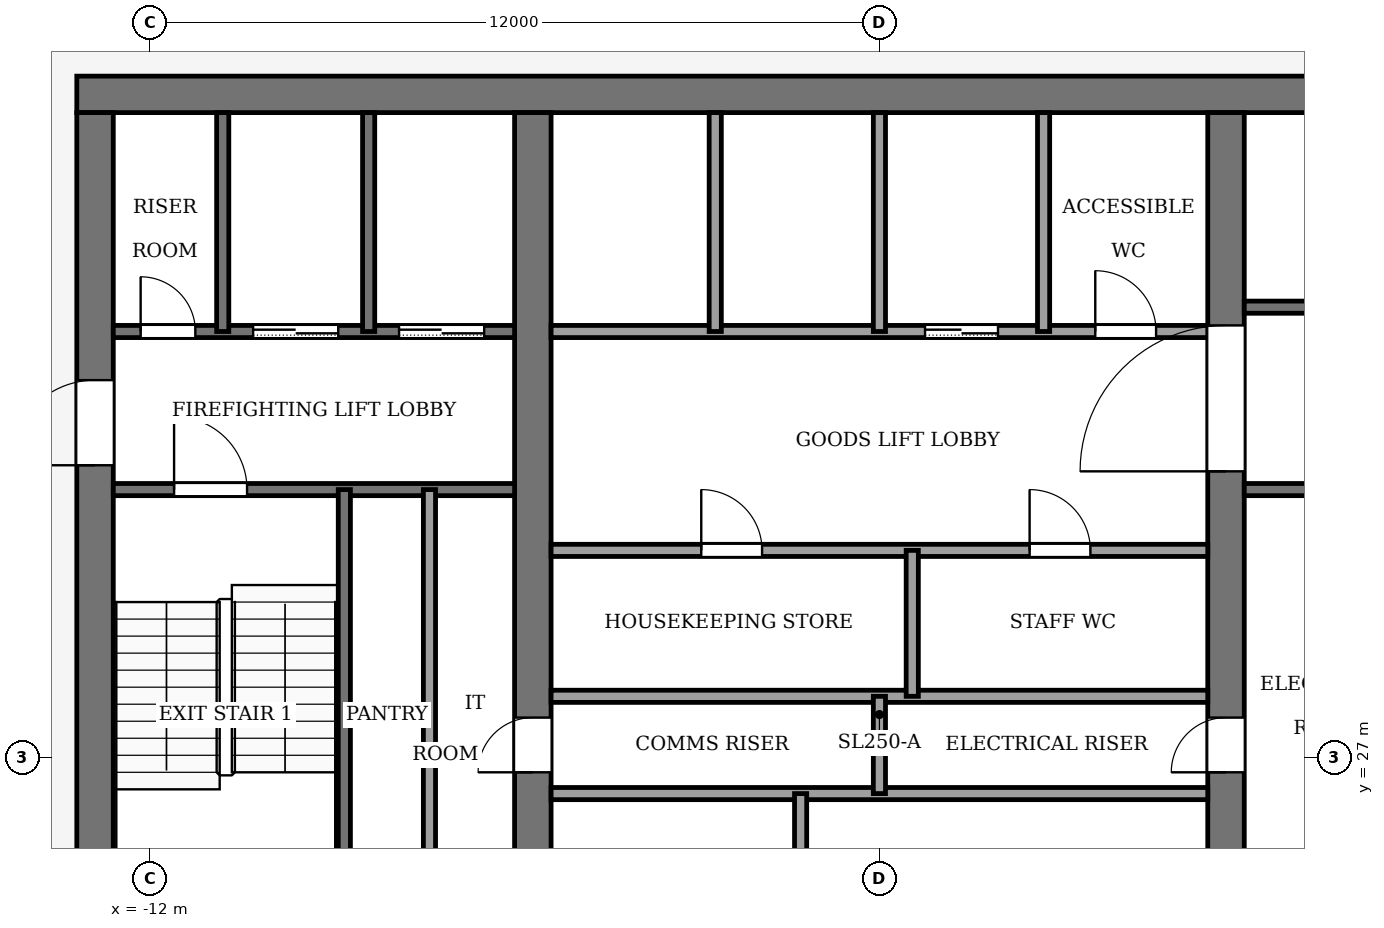
"""IFC4 building model, lengths in metres.
Left out: names, types, materials, properties, quantities, classifications, styles, units other than length and angle.
Written with IfcOpenShell. Run it as: python <this file> out.ifc"""

import sys

from ifc_helpers import new_model, si_unit, direction, frame, frame_2d, origin, place, context, subcontext, project, spatial, rectangle, extrude, element, fill, save


model = new_model("IFC4")
c1 = context("Model", 3, precision=1e-05, world=origin(), true_north=direction((0.0, 1.0)))
c2 = subcontext(c1, "Body", "Model", "MODEL_VIEW")
j1 = project(units=[si_unit("LENGTHUNIT", "METRE"), si_unit("PLANEANGLEUNIT", "RADIAN")], contexts=[c1])
p1 = place(None, origin())
s1 = spatial("IfcSite", under=j1, at=p1, CompositionType="ELEMENT")
p2 = place(p1, origin())
s2 = spatial("IfcBuilding", under=s1, at=p2, CompositionType="ELEMENT")
p3 = place(p2, frame((0.0, 0.0, 314.0)))
s3 = spatial("IfcBuildingStorey", under=s2, at=p3, CompositionType="ELEMENT", Elevation=314.0)
p4 = place(p3, frame((-13.2, 37.9, -0.13), z_axis=(0.0, 0.0, 1.0), x_axis=(1.0, 0.0, 0.0)))
e1 = element("IfcWall", 1, at=p4, inside=s3, PredefinedType="SHEAR", context=c2, shape_type="SweptSolid", body=[
    extrude(rectangle(XDim=26.4, YDim=0.6, at=frame_2d((13.2, 0.0))), origin(), (0.0, 0.0, 1.0), 4.0),
])
p5 = place(p3, frame((-12.9, 18.4, -0.13), z_axis=(0.0, 0.0, 1.0), x_axis=(0.0, 1.0, 0.0)))
e2 = element("IfcWall", 2, at=p5, inside=s3, PredefinedType="SHEAR", context=c2, shape_type="SweptSolid", body=[
    extrude(rectangle(XDim=19.2, YDim=0.6, at=frame_2d((9.6, 0.0))), origin(), (0.0, 0.0, 1.0), 4.0),
])
p6 = place(p5, frame((2.8, 0.0, 0.13)))
e3 = element("IfcOpeningElement", 3, at=p6, cuts=e2, PredefinedType="OPENING", context=c2, shape_type="SweptSolid", body=[
    extrude(rectangle(XDim=2.4, YDim=2.4, at=frame_2d((1.2, 1.2))), frame((0.0, 0.31, 0.0), z_axis=(0.0, -1.0, 0.0), x_axis=(1.0, 0.0, 0.0)), (0.0, 0.0, 1.0), 0.62),
])
p7 = place(p5, frame((13.4, 0.0, 0.13)))
e4 = element("IfcOpeningElement", 4, at=p7, cuts=e2, PredefinedType="OPENING", context=c2, shape_type="SweptSolid", body=[
    extrude(rectangle(XDim=1.4, YDim=2.2, at=frame_2d((0.7, 1.1))), frame((0.0, 0.31, 0.0), z_axis=(0.0, -1.0, 0.0), x_axis=(1.0, 0.0, 0.0)), (0.0, 0.0, 1.0), 0.62),
])
p8 = place(p3, frame((-5.7, 18.4, -0.13), z_axis=(0.0, 0.0, 1.0), x_axis=(0.0, 1.0, 0.0)))
e5 = element("IfcWall", 5, at=p8, inside=s3, PredefinedType="SHEAR", context=c2, shape_type="SweptSolid", body=[
    extrude(rectangle(XDim=19.2, YDim=0.6, at=frame_2d((9.6, 0.0))), origin(), (0.0, 0.0, 1.0), 4.0),
])
p9 = place(p8, frame((8.35, 0.0, 0.13)))
e6 = element("IfcOpeningElement", 6, at=p9, cuts=e5, PredefinedType="OPENING", context=c2, shape_type="SweptSolid", body=[
    extrude(rectangle(XDim=0.9, YDim=2.1, at=frame_2d((0.45, 1.05))), frame((0.0, 0.31, 0.0), z_axis=(0.0, -1.0, 0.0), x_axis=(1.0, 0.0, 0.0)), (0.0, 0.0, 1.0), 0.62),
])
p10 = place(p3, frame((5.7, 18.4, -0.13), z_axis=(0.0, 0.0, 1.0), x_axis=(0.0, 1.0, 0.0)))
e7 = element("IfcWall", 7, at=p10, inside=s3, PredefinedType="SHEAR", context=c2, shape_type="SweptSolid", body=[
    extrude(rectangle(XDim=19.2, YDim=0.6, at=frame_2d((9.6, 0.0))), origin(), (0.0, 0.0, 1.0), 4.0),
])
p11 = place(p10, frame((8.35, 0.0, 0.13)))
e8 = element("IfcOpeningElement", 8, at=p11, cuts=e7, PredefinedType="OPENING", context=c2, shape_type="SweptSolid", body=[
    extrude(rectangle(XDim=0.9, YDim=2.1, at=frame_2d((0.45, 1.05))), frame((0.0, 0.31, 0.0), z_axis=(0.0, -1.0, 0.0), x_axis=(1.0, 0.0, 0.0)), (0.0, 0.0, 1.0), 0.62),
])
p12 = place(p10, frame((13.3, 0.0, 0.13)))
e9 = element("IfcOpeningElement", 9, at=p12, cuts=e7, PredefinedType="OPENING", context=c2, shape_type="SweptSolid", body=[
    extrude(rectangle(XDim=2.4, YDim=2.4, at=frame_2d((1.2, 1.2))), frame((0.0, 0.31, 0.0), z_axis=(0.0, -1.0, 0.0), x_axis=(1.0, 0.0, 0.0)), (0.0, 0.0, 1.0), 0.62),
])
for number, where, z_axis, x_axis in (
    (10, (-5.4, 26.4, 0.0), (0.0, 0.0, 1.0), (1.0, 0.0, 0.0)),
    (11, (-5.4, 28.0, 0.0), (0.0, 0.0, 1.0), (1.0, 0.0, 0.0)),
):
    element("IfcWall", number, at=place(p3, frame(where, z_axis=z_axis, x_axis=x_axis)), inside=s3, PredefinedType="PARTITIONING", context=c2, shape_type="SweptSolid", body=[
        extrude(rectangle(XDim=10.8, YDim=0.2, at=frame_2d((5.4, 0.0))), origin(), (0.0, 0.0, 1.0), 3.87),
    ])
p13 = place(p3, frame((-5.4, 30.4, 0.0), z_axis=(0.0, 0.0, 1.0), x_axis=(1.0, 0.0, 0.0)))
e12 = element("IfcWall", 12, at=p13, inside=s3, PredefinedType="PARTITIONING", context=c2, shape_type="SweptSolid", body=[
    extrude(rectangle(XDim=10.8, YDim=0.2, at=frame_2d((5.4, 0.0))), origin(), (0.0, 0.0, 1.0), 3.87),
])
p14 = place(p13, frame((2.47, 0.0, 0.0)))
e13 = element("IfcOpeningElement", 13, at=p14, cuts=e12, PredefinedType="OPENING", context=c2, shape_type="SweptSolid", body=[
    extrude(rectangle(XDim=1.0, YDim=2.1, at=frame_2d((0.5, 1.05))), frame((0.0, 0.11, 0.0), z_axis=(0.0, -1.0, 0.0), x_axis=(1.0, 0.0, 0.0)), (0.0, 0.0, 1.0), 0.22),
])
p15 = place(p13, frame((7.87, 0.0, 0.0)))
e14 = element("IfcOpeningElement", 14, at=p15, cuts=e12, PredefinedType="OPENING", context=c2, shape_type="SweptSolid", body=[
    extrude(rectangle(XDim=1.0, YDim=2.1, at=frame_2d((0.5, 1.05))), frame((0.0, 0.11, 0.0), z_axis=(0.0, -1.0, 0.0), x_axis=(1.0, 0.0, 0.0)), (0.0, 0.0, 1.0), 0.22),
])
p16 = place(p3, frame((-12.6, 31.4, 0.0), z_axis=(0.0, 0.0, 1.0), x_axis=(1.0, 0.0, 0.0)))
e15 = element("IfcWall", 15, at=p16, inside=s3, PredefinedType="PARTITIONING", context=c2, shape_type="SweptSolid", body=[
    extrude(rectangle(XDim=6.6, YDim=0.2, at=frame_2d((3.3, 0.0))), origin(), (0.0, 0.0, 1.0), 3.87),
])
p17 = place(p16, frame((1.0, 0.0, 0.0)))
e16 = element("IfcOpeningElement", 16, at=p17, cuts=e15, PredefinedType="OPENING", context=c2, shape_type="SweptSolid", body=[
    extrude(rectangle(XDim=1.2, YDim=2.2, at=frame_2d((0.6, 1.1))), frame((0.0, 0.11, 0.0), z_axis=(0.0, -1.0, 0.0), x_axis=(1.0, 0.0, 0.0)), (0.0, 0.0, 1.0), 0.22),
])
p18 = place(p3, frame((6.0, 31.4, 0.0), z_axis=(0.0, 0.0, 1.0), x_axis=(1.0, 0.0, 0.0)))
e17 = element("IfcWall", 17, at=p18, inside=s3, PredefinedType="PARTITIONING", context=c2, shape_type="SweptSolid", body=[
    extrude(rectangle(XDim=6.6, YDim=0.2, at=frame_2d((3.3, 0.0))), origin(), (0.0, 0.0, 1.0), 3.87),
])
p19 = place(p3, frame((-12.6, 34.0, 0.0), z_axis=(0.0, 0.0, 1.0), x_axis=(1.0, 0.0, 0.0)))
e18 = element("IfcWall", 18, at=p19, inside=s3, PredefinedType="PARTITIONING", context=c2, shape_type="SweptSolid", body=[
    extrude(rectangle(XDim=6.6, YDim=0.2, at=frame_2d((3.3, 0.0))), origin(), (0.0, 0.0, 1.0), 3.87),
])
p20 = place(p19, frame((4.7, 0.0, 0.0)))
e19 = element("IfcOpeningElement", 19, at=p20, cuts=e18, PredefinedType="OPENING", context=c2, shape_type="SweptSolid", body=[
    extrude(rectangle(XDim=1.4, YDim=2.2, at=frame_2d((0.7, 1.1))), frame((0.0, 0.11, 0.0), z_axis=(0.0, -1.0, 0.0), x_axis=(1.0, 0.0, 0.0)), (0.0, 0.0, 1.0), 0.22),
])
p21 = place(p19, frame((2.3, 0.0, 0.0)))
e20 = element("IfcOpeningElement", 20, at=p21, cuts=e18, PredefinedType="OPENING", context=c2, shape_type="SweptSolid", body=[
    extrude(rectangle(XDim=1.4, YDim=2.2, at=frame_2d((0.7, 1.1))), frame((0.0, 0.11, 0.0), z_axis=(0.0, -1.0, 0.0), x_axis=(1.0, 0.0, 0.0)), (0.0, 0.0, 1.0), 0.22),
])
p22 = place(p19, frame((0.45, 0.0, 0.0)))
e21 = element("IfcOpeningElement", 21, at=p22, cuts=e18, PredefinedType="OPENING", context=c2, shape_type="SweptSolid", body=[
    extrude(rectangle(XDim=0.9, YDim=2.1, at=frame_2d((0.45, 1.05))), frame((0.0, 0.11, 0.0), z_axis=(0.0, -1.0, 0.0), x_axis=(1.0, 0.0, 0.0)), (0.0, 0.0, 1.0), 0.22),
])
p23 = place(p3, frame((-5.4, 34.0, 0.0), z_axis=(0.0, 0.0, 1.0), x_axis=(1.0, 0.0, 0.0)))
e22 = element("IfcWall", 22, at=p23, inside=s3, PredefinedType="PARTITIONING", context=c2, shape_type="SweptSolid", body=[
    extrude(rectangle(XDim=10.8, YDim=0.2, at=frame_2d((5.4, 0.0))), origin(), (0.0, 0.0, 1.0), 3.87),
])
p24 = place(p23, frame((6.15, 0.0, 0.0)))
e23 = element("IfcOpeningElement", 23, at=p24, cuts=e22, PredefinedType="OPENING", context=c2, shape_type="SweptSolid", body=[
    extrude(rectangle(XDim=1.2, YDim=2.2, at=frame_2d((0.6, 1.1))), frame((0.0, 0.11, 0.0), z_axis=(0.0, -1.0, 0.0), x_axis=(1.0, 0.0, 0.0)), (0.0, 0.0, 1.0), 0.22),
])
p25 = place(p23, frame((8.95, 0.0, 0.0)))
e24 = element("IfcOpeningElement", 24, at=p25, cuts=e22, PredefinedType="OPENING", context=c2, shape_type="SweptSolid", body=[
    extrude(rectangle(XDim=1.0, YDim=2.1, at=frame_2d((0.5, 1.05))), frame((0.0, 0.11, 0.0), z_axis=(0.0, -1.0, 0.0), x_axis=(1.0, 0.0, 0.0)), (0.0, 0.0, 1.0), 0.22),
])
p26 = place(p3, frame((6.0, 34.4, 0.0), z_axis=(0.0, 0.0, 1.0), x_axis=(1.0, 0.0, 0.0)))
e25 = element("IfcWall", 25, at=p26, inside=s3, PredefinedType="PARTITIONING", context=c2, shape_type="SweptSolid", body=[
    extrude(rectangle(XDim=6.6, YDim=0.2, at=frame_2d((3.3, 0.0))), origin(), (0.0, 0.0, 1.0), 3.87),
])
p27 = place(p26, frame((4.8, 0.0, 0.0)))
e26 = element("IfcOpeningElement", 26, at=p27, cuts=e25, PredefinedType="OPENING", context=c2, shape_type="SweptSolid", body=[
    extrude(rectangle(XDim=1.2, YDim=2.2, at=frame_2d((0.6, 1.1))), frame((0.0, 0.11, 0.0), z_axis=(0.0, -1.0, 0.0), x_axis=(1.0, 0.0, 0.0)), (0.0, 0.0, 1.0), 0.22),
])
p28 = place(p3, frame((-10.8, 34.0, 0.0), z_axis=(0.0, 0.0, 1.0), x_axis=(0.0, 1.0, 0.0)))
e27 = element("IfcWall", 27, at=p28, inside=s3, PredefinedType="PARTITIONING", context=c2, shape_type="SweptSolid", body=[
    extrude(rectangle(XDim=3.6, YDim=0.2, at=frame_2d((1.8, 0.0))), origin(), (0.0, 0.0, 1.0), 3.87),
])
p29 = place(p3, frame((-8.8, 24.0, 0.0), z_axis=(0.0, 0.0, 1.0), x_axis=(0.0, 1.0, 0.0)))
e28 = element("IfcWall", 28, at=p29, inside=s3, PredefinedType="PARTITIONING", context=c2, shape_type="SweptSolid", body=[
    extrude(rectangle(XDim=7.4, YDim=0.2, at=frame_2d((3.7, 0.0))), origin(), (0.0, 0.0, 1.0), 3.87),
])
p30 = place(p3, frame((-8.4, 34.0, 0.0), z_axis=(0.0, 0.0, 1.0), x_axis=(0.0, 1.0, 0.0)))
e29 = element("IfcWall", 29, at=p30, inside=s3, PredefinedType="PARTITIONING", context=c2, shape_type="SweptSolid", body=[
    extrude(rectangle(XDim=3.6, YDim=0.2, at=frame_2d((1.8, 0.0))), origin(), (0.0, 0.0, 1.0), 3.87),
])
p31 = place(p3, frame((-7.4, 24.0, 0.0), z_axis=(0.0, 0.0, 1.0), x_axis=(0.0, 1.0, 0.0)))
e30 = element("IfcWall", 30, at=p31, inside=s3, PredefinedType="PARTITIONING", context=c2, shape_type="SweptSolid", body=[
    extrude(rectangle(XDim=7.4, YDim=0.2, at=frame_2d((3.7, 0.0))), origin(), (0.0, 0.0, 1.0), 3.87),
])
p32 = place(p3, frame((-2.7, 34.0, 0.0), z_axis=(0.0, 0.0, 1.0), x_axis=(0.0, 1.0, 0.0)))
e31 = element("IfcWall", 31, at=p32, inside=s3, PredefinedType="PARTITIONING", context=c2, shape_type="SweptSolid", body=[
    extrude(rectangle(XDim=3.6, YDim=0.2, at=frame_2d((1.8, 0.0))), origin(), (0.0, 0.0, 1.0), 3.87),
])
p33 = place(p3, frame((-1.296, 24.0, 0.0), z_axis=(0.0, 0.0, 1.0), x_axis=(0.0, 1.0, 0.0)))
e32 = element("IfcWall", 32, at=p33, inside=s3, PredefinedType="PARTITIONING", context=c2, shape_type="SweptSolid", body=[
    extrude(rectangle(XDim=2.4, YDim=0.2, at=frame_2d((1.2, 0.0))), origin(), (0.0, 0.0, 1.0), 3.87),
])
p34 = place(p3, frame((0.0, 26.4, 0.0), z_axis=(0.0, 0.0, 1.0), x_axis=(0.0, 1.0, 0.0)))
e33 = element("IfcWall", 33, at=p34, inside=s3, PredefinedType="PARTITIONING", context=c2, shape_type="SweptSolid", body=[
    extrude(rectangle(XDim=1.6, YDim=0.2, at=frame_2d((0.8, 0.0))), origin(), (0.0, 0.0, 1.0), 3.87),
])
p35 = place(p3, frame((0.0, 34.0, 0.0), z_axis=(0.0, 0.0, 1.0), x_axis=(0.0, 1.0, 0.0)))
e34 = element("IfcWall", 34, at=p35, inside=s3, PredefinedType="PARTITIONING", context=c2, shape_type="SweptSolid", body=[
    extrude(rectangle(XDim=3.6, YDim=0.2, at=frame_2d((1.8, 0.0))), origin(), (0.0, 0.0, 1.0), 3.87),
])
p36 = place(p3, frame((0.54, 28.0, 0.0), z_axis=(0.0, 0.0, 1.0), x_axis=(0.0, 1.0, 0.0)))
e35 = element("IfcWall", 35, at=p36, inside=s3, PredefinedType="PARTITIONING", context=c2, shape_type="SweptSolid", body=[
    extrude(rectangle(XDim=2.4, YDim=0.2, at=frame_2d((1.2, 0.0))), origin(), (0.0, 0.0, 1.0), 3.87),
])
p37 = place(p3, frame((2.7, 34.0, 0.0), z_axis=(0.0, 0.0, 1.0), x_axis=(0.0, 1.0, 0.0)))
e36 = element("IfcWall", 36, at=p37, inside=s3, PredefinedType="PARTITIONING", context=c2, shape_type="SweptSolid", body=[
    extrude(rectangle(XDim=3.6, YDim=0.2, at=frame_2d((1.8, 0.0))), origin(), (0.0, 0.0, 1.0), 3.87),
])
p38 = place(p24, origin())
e37 = element("IfcDoor", 37, at=p38, inside=s3, OperationType="SLIDING_TO_LEFT", PredefinedType="DOOR", context=c2, shape_type="SweptSolid", body=[
    extrude(rectangle(XDim=1.2, YDim=2.2, at=frame_2d((0.6, 1.1))), frame((0.0, 0.025, 0.0), z_axis=(0.0, -1.0, 0.0), x_axis=(1.0, 0.0, 0.0)), (0.0, 0.0, 1.0), 0.05),
])
fill(e23, e37)
p39 = place(p20, origin())
e38 = element("IfcDoor", 38, at=p39, inside=s3, OperationType="SLIDING_TO_LEFT", PredefinedType="DOOR", context=c2, shape_type="SweptSolid", body=[
    extrude(rectangle(XDim=1.4, YDim=2.2, at=frame_2d((0.7, 1.1))), frame((0.0, 0.025, 0.0), z_axis=(0.0, -1.0, 0.0), x_axis=(1.0, 0.0, 0.0)), (0.0, 0.0, 1.0), 0.05),
])
fill(e19, e38)
p40 = place(p21, origin())
e39 = element("IfcDoor", 39, at=p40, inside=s3, OperationType="SLIDING_TO_LEFT", PredefinedType="DOOR", context=c2, shape_type="SweptSolid", body=[
    extrude(rectangle(XDim=1.4, YDim=2.2, at=frame_2d((0.7, 1.1))), frame((0.0, 0.025, 0.0), z_axis=(0.0, -1.0, 0.0), x_axis=(1.0, 0.0, 0.0)), (0.0, 0.0, 1.0), 0.05),
])
fill(e20, e39)
p41 = place(p22, origin())
e40 = element("IfcDoor", 40, at=p41, inside=s3, OperationType="SINGLE_SWING_RIGHT", PredefinedType="DOOR", context=c2, shape_type="SweptSolid", body=[
    extrude(rectangle(XDim=0.9, YDim=2.1, at=frame_2d((0.45, 1.05))), frame((0.0, 0.025, 0.0), z_axis=(0.0, -1.0, 0.0), x_axis=(1.0, 0.0, 0.0)), (0.0, 0.0, 1.0), 0.05),
])
fill(e21, e40)
p42 = place(p14, origin())
e41 = element("IfcDoor", 41, at=p42, inside=s3, OperationType="SINGLE_SWING_RIGHT", PredefinedType="DOOR", context=c2, shape_type="SweptSolid", body=[
    extrude(rectangle(XDim=1.0, YDim=2.1, at=frame_2d((0.5, 1.05))), frame((0.0, 0.025, 0.0), z_axis=(0.0, -1.0, 0.0), x_axis=(1.0, 0.0, 0.0)), (0.0, 0.0, 1.0), 0.05),
])
fill(e13, e41)
p43 = place(p15, origin())
e42 = element("IfcDoor", 42, at=p43, inside=s3, OperationType="SINGLE_SWING_LEFT", PredefinedType="DOOR", context=c2, shape_type="SweptSolid", body=[
    extrude(rectangle(XDim=1.0, YDim=2.1, at=frame_2d((0.5, 1.05))), frame((0.0, 0.025, 0.0), z_axis=(0.0, -1.0, 0.0), x_axis=(1.0, 0.0, 0.0)), (0.0, 0.0, 1.0), 0.05),
])
fill(e14, e42)
p44 = place(p25, origin())
e43 = element("IfcDoor", 43, at=p44, inside=s3, OperationType="SINGLE_SWING_LEFT", PredefinedType="DOOR", context=c2, shape_type="SweptSolid", body=[
    extrude(rectangle(XDim=1.0, YDim=2.1, at=frame_2d((0.5, 1.05))), frame((0.0, 0.025, 0.0), z_axis=(0.0, -1.0, 0.0), x_axis=(1.0, 0.0, 0.0)), (0.0, 0.0, 1.0), 0.05),
])
fill(e24, e43)
p45 = place(p9, origin())
e44 = element("IfcDoor", 44, at=p45, inside=s3, OperationType="SINGLE_SWING_LEFT", PredefinedType="DOOR", context=c2, shape_type="SweptSolid", body=[
    extrude(rectangle(XDim=0.9, YDim=2.1, at=frame_2d((0.45, 1.05))), frame((0.0, 0.025, 0.0), z_axis=(0.0, -1.0, 0.0), x_axis=(1.0, 0.0, 0.0)), (0.0, 0.0, 1.0), 0.05),
])
fill(e6, e44)
p46 = place(p11, origin())
e45 = element("IfcDoor", 45, at=p46, inside=s3, OperationType="SINGLE_SWING_RIGHT", PredefinedType="DOOR", context=c2, shape_type="SweptSolid", body=[
    extrude(rectangle(XDim=0.9, YDim=2.1, at=frame_2d((0.45, 1.05))), frame((0.0, 0.025, 0.0), z_axis=(0.0, -1.0, 0.0), x_axis=(1.0, 0.0, 0.0)), (0.0, 0.0, 1.0), 0.05),
])
fill(e8, e45)
p47 = place(p17, origin())
e46 = element("IfcDoor", 46, at=p47, inside=s3, OperationType="SINGLE_SWING_RIGHT", PredefinedType="DOOR", context=c2, shape_type="SweptSolid", body=[
    extrude(rectangle(XDim=1.2, YDim=2.2, at=frame_2d((0.6, 1.1))), frame((0.0, 0.025, 0.0), z_axis=(0.0, -1.0, 0.0), x_axis=(1.0, 0.0, 0.0)), (0.0, 0.0, 1.0), 0.05),
])
fill(e16, e46)
p48 = place(p12, origin())
e47 = element("IfcDoor", 47, at=p48, inside=s3, OperationType="DOUBLE_DOOR_SINGLE_SWING", PredefinedType="DOOR", context=c2, shape_type="SweptSolid", body=[
    extrude(rectangle(XDim=2.4, YDim=2.4, at=frame_2d((1.2, 1.2))), frame((0.0, 0.025, 0.0), z_axis=(0.0, -1.0, 0.0), x_axis=(1.0, 0.0, 0.0)), (0.0, 0.0, 1.0), 0.05),
])
fill(e9, e47)
p49 = place(p7, origin())
e48 = element("IfcDoor", 48, at=p49, inside=s3, OperationType="SINGLE_SWING_RIGHT", PredefinedType="DOOR", context=c2, shape_type="SweptSolid", body=[
    extrude(rectangle(XDim=1.4, YDim=2.2, at=frame_2d((0.7, 1.1))), frame((0.0, 0.025, 0.0), z_axis=(0.0, -1.0, 0.0), x_axis=(1.0, 0.0, 0.0)), (0.0, 0.0, 1.0), 0.05),
])
fill(e4, e48)
save(model, sys.argv[1])
